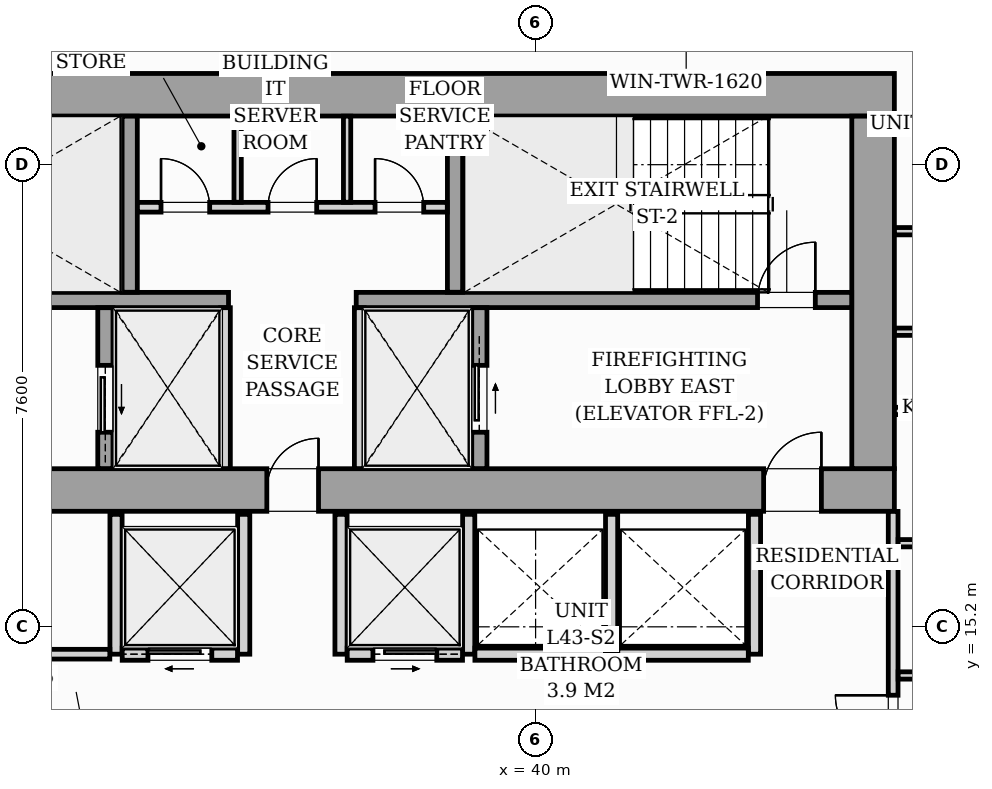
"""IFC4 building model, lengths in metres.
Left out: names, types, materials, properties, quantities, classifications, styles, units other than length and angle.
Written with IfcOpenShell. Run it as: python <this file> out.ifc"""

import sys

from ifc_helpers import new_model, si_unit, direction, frame, frame_2d, origin, origin_2d, place, context, subcontext, project, spatial, rectangle, i_section, extrude, source, transform, mapped, element, fill, save


model = new_model("IFC4")
c1 = context("Model", 3, precision=1e-05, world=origin(), true_north=direction((0.0, 1.0)))
c2 = subcontext(c1, "Body", "Model", "MODEL_VIEW")
j1 = project(units=[si_unit("LENGTHUNIT", "METRE"), si_unit("PLANEANGLEUNIT", "RADIAN")], contexts=[c1])
p1 = place(None, origin())
s1 = spatial("IfcSite", under=j1, at=p1, CompositionType="ELEMENT")
p2 = place(p1, origin())
s2 = spatial("IfcBuilding", under=s1, at=p2, CompositionType="ELEMENT")
p3 = place(p2, frame((0.0, 0.0, 150.2)))
s3 = spatial("IfcBuildingStorey", under=s2, at=p3, CompositionType="ELEMENT", Elevation=150.2)
m1 = source(origin(), c2, "Body", "SweptSolid", [
    extrude(i_section(OverallWidth=0.421, OverallDepth=0.465, WebThickness=0.045, FlangeThickness=0.073, FilletRadius=0.018, at=origin_2d()), origin(), (0.0, 0.0, 1.0), 3.196),
])
for number, where, z_axis, x_axis in (
    (1, (33.12, 17.4, 0.002), (0.0, 0.0, 1.0), (1.0, 0.0, 0.0)),
    (2, (38.88, 17.4, 0.002), (0.0, 0.0, 1.0), (1.0, 0.0, 0.0)),
    (3, (45.6, 17.4, 0.002), (0.0, 0.0, 1.0), (1.0, 0.0, 0.0)),
    (4, (33.12, 24.0, 0.002), (0.0, 0.0, 1.0), (1.0, 0.0, 0.0)),
    (5, (38.88, 24.0, 0.002), (0.0, 0.0, 1.0), (1.0, 0.0, 0.0)),
    (6, (45.6, 24.0, 0.002), (0.0, 0.0, 1.0), (1.0, 0.0, 0.0)),
):
    element("IfcColumn", number, at=place(p3, frame(where, z_axis=z_axis, x_axis=x_axis)), inside=s3, PredefinedType="PILASTER", context=c2, shape_type="MappedRepresentation", body=[
        mapped(m1, transform((0.0, 0.0, 0.0), scale=1.0)),
    ])
p4 = place(p3, frame((40.983, 25.727, 0.0), z_axis=(0.0, 0.0, 1.0), x_axis=(0.995395844771, -0.095849424686, 0.0)))
e7 = element("IfcWall", 7, at=p4, inside=s3, PredefinedType="STANDARD", context=c2, shape_type="SweptSolid", body=[
    extrude(rectangle(XDim=17.01, YDim=0.26, at=frame_2d((8.505, 0.0))), origin(), (0.0, 0.0, 1.0), 2.94),
])
p5 = place(p4, frame((9.1, 0.0, 0.0)))
e8 = element("IfcOpeningElement", 8, at=p5, cuts=e7, PredefinedType="OPENING", context=c2, shape_type="SweptSolid", body=[
    extrude(rectangle(XDim=1.8, YDim=2.06, at=frame_2d((0.9, 1.03))), frame((0.0, 0.14, 0.0), z_axis=(0.0, -1.0, 0.0), x_axis=(1.0, 0.0, 0.0)), (0.0, 0.0, 1.0), 0.28),
])
p6 = place(p4, frame((0.7, 0.0, 0.65)))
e9 = element("IfcOpeningElement", 9, at=p6, cuts=e7, PredefinedType="OPENING", context=c2, shape_type="SweptSolid", body=[
    extrude(rectangle(XDim=1.6, YDim=1.5, at=frame_2d((0.8, 0.75))), frame((0.0, 0.14, 0.0), z_axis=(0.0, -1.0, 0.0), x_axis=(1.0, 0.0, 0.0)), (0.0, 0.0, 1.0), 0.28),
])
p7 = place(p3, frame((26.1, 17.45, 0.0), z_axis=(0.0, 0.0, 1.0), x_axis=(1.0, 0.0, 0.0)))
e10 = element("IfcWall", 10, at=p7, inside=s3, PredefinedType="SHEAR", context=c2, shape_type="SweptSolid", body=[
    extrude(rectangle(XDim=19.8, YDim=0.7, at=frame_2d((9.9, 0.0))), origin(), (0.0, 0.0, 1.0), 3.2),
])
p8 = place(p7, frame((1.05, 0.0, 0.0)))
e11 = element("IfcOpeningElement", 11, at=p8, cuts=e10, PredefinedType="OPENING", context=c2, shape_type="SweptSolid", body=[
    extrude(rectangle(XDim=0.95, YDim=2.06, at=frame_2d((0.475, 1.03))), frame((0.0, 0.36, 0.0), z_axis=(0.0, -1.0, 0.0), x_axis=(1.0, 0.0, 0.0)), (0.0, 0.0, 1.0), 0.72),
])
p9 = place(p7, frame((9.48, 0.0, 0.0)))
e12 = element("IfcOpeningElement", 12, at=p9, cuts=e10, PredefinedType="OPENING", context=c2, shape_type="SweptSolid", body=[
    extrude(rectangle(XDim=0.85, YDim=2.0, at=frame_2d((0.425, 1.0))), frame((0.0, 0.36, 0.0), z_axis=(0.0, -1.0, 0.0), x_axis=(1.0, 0.0, 0.0)), (0.0, 0.0, 1.0), 0.72),
])
p10 = place(p7, frame((17.65, 0.0, 0.0)))
e13 = element("IfcOpeningElement", 13, at=p10, cuts=e10, PredefinedType="OPENING", context=c2, shape_type="SweptSolid", body=[
    extrude(rectangle(XDim=0.95, YDim=2.06, at=frame_2d((0.475, 1.03))), frame((0.0, 0.36, 0.0), z_axis=(0.0, -1.0, 0.0), x_axis=(1.0, 0.0, 0.0)), (0.0, 0.0, 1.0), 0.72),
])
p11 = place(p3, frame((26.1, 23.95, 0.0), z_axis=(0.0, 0.0, 1.0), x_axis=(1.0, 0.0, 0.0)))
e14 = element("IfcWall", 14, at=p11, inside=s3, PredefinedType="SHEAR", context=c2, shape_type="SweptSolid", body=[
    extrude(rectangle(XDim=19.8, YDim=0.7, at=frame_2d((9.9, 0.0))), origin(), (0.0, 0.0, 1.0), 3.2),
])
p12 = place(p3, frame((45.55, 17.802, 0.0), z_axis=(0.0, 0.0, 1.0), x_axis=(0.0, 1.0, 0.0)))
e15 = element("IfcWall", 15, at=p12, inside=s3, PredefinedType="SHEAR", context=c2, shape_type="SweptSolid", body=[
    extrude(rectangle(XDim=5.796, YDim=0.7, at=frame_2d((2.898, 0.0))), origin(), (0.0, 0.0, 1.0), 3.2),
])
p13 = place(p3, frame((26.802, 20.575, 0.0), z_axis=(0.0, 0.0, 1.0), x_axis=(1.0, 0.0, 0.0)))
e16 = element("IfcWall", 16, at=p13, inside=s3, PredefinedType="SOLIDWALL", context=c2, shape_type="SweptSolid", body=[
    extrude(rectangle(XDim=8.148, YDim=0.25, at=frame_2d((4.074, 0.0))), origin(), (0.0, 0.0, 1.0), 3.2),
])
p14 = place(p13, frame((0.348, 0.0, 0.0)))
e17 = element("IfcOpeningElement", 17, at=p14, cuts=e16, PredefinedType="OPENING", context=c2, shape_type="SweptSolid", body=[
    extrude(rectangle(XDim=0.95, YDim=2.06, at=frame_2d((0.475, 1.03))), frame((0.0, 0.135, 0.0), z_axis=(0.0, -1.0, 0.0), x_axis=(1.0, 0.0, 0.0)), (0.0, 0.0, 1.0), 0.27),
])
p15 = place(p3, frame((37.05, 20.575, 0.0), z_axis=(0.0, 0.0, 1.0), x_axis=(1.0, 0.0, 0.0)))
e18 = element("IfcWall", 18, at=p15, inside=s3, PredefinedType="SOLIDWALL", context=c2, shape_type="SweptSolid", body=[
    extrude(rectangle(XDim=8.148, YDim=0.25, at=frame_2d((4.074, 0.0))), origin(), (0.0, 0.0, 1.0), 3.2),
])
p16 = place(p15, frame((6.6, 0.0, 0.0)))
e19 = element("IfcOpeningElement", 19, at=p16, cuts=e18, PredefinedType="OPENING", context=c2, shape_type="SweptSolid", body=[
    extrude(rectangle(XDim=0.95, YDim=2.06, at=frame_2d((0.475, 1.03))), frame((0.0, 0.135, 0.0), z_axis=(0.0, -1.0, 0.0), x_axis=(1.0, 0.0, 0.0)), (0.0, 0.0, 1.0), 0.27),
])
for number, where, z_axis, x_axis in (
    (20, (33.325, 20.702, 0.0), (0.0, 0.0, 1.0), (0.0, 1.0, 0.0)),
    (21, (38.675, 20.702, 0.0), (0.0, 0.0, 1.0), (0.0, 1.0, 0.0)),
):
    element("IfcWall", number, at=place(p3, frame(where, z_axis=z_axis, x_axis=x_axis)), inside=s3, PredefinedType="SOLIDWALL", context=c2, shape_type="SweptSolid", body=[
        extrude(rectangle(XDim=2.896, YDim=0.25, at=frame_2d((1.448, 0.0))), origin(), (0.0, 0.0, 1.0), 3.2),
    ])
p17 = place(p3, frame((32.925, 17.802, 0.0), z_axis=(0.0, 0.0, 1.0), x_axis=(0.0, 1.0, 0.0)))
e22 = element("IfcWall", 22, at=p17, inside=s3, PredefinedType="SOLIDWALL", context=c2, shape_type="SweptSolid", body=[
    extrude(rectangle(XDim=2.646, YDim=0.25, at=frame_2d((1.323, 0.0))), origin(), (0.0, 0.0, 1.0), 3.2),
])
p18 = place(p17, frame((0.598, 0.0, 0.0)))
e23 = element("IfcOpeningElement", 23, at=p18, cuts=e22, PredefinedType="OPENING", context=c2, shape_type="SweptSolid", body=[
    extrude(rectangle(XDim=1.1, YDim=2.08, at=frame_2d((0.55, 1.04))), frame((0.0, 0.135, 0.0), z_axis=(0.0, -1.0, 0.0), x_axis=(1.0, 0.0, 0.0)), (0.0, 0.0, 1.0), 0.27),
])
for number, where, z_axis, x_axis in (
    (24, (34.9, 17.802, 0.0), (0.0, 0.0, 1.0), (0.0, 1.0, 0.0)),
    (25, (37.1, 17.802, 0.0), (0.0, 0.0, 1.0), (0.0, 1.0, 0.0)),
):
    element("IfcWall", number, at=place(p3, frame(where, z_axis=z_axis, x_axis=x_axis)), inside=s3, PredefinedType="PARTITIONING", context=c2, shape_type="SweptSolid", body=[
        extrude(rectangle(XDim=2.646, YDim=0.16, at=frame_2d((1.323, 0.0))), origin(), (0.0, 0.0, 1.0), 2.94),
    ])
p19 = place(p3, frame((39.075, 17.802, 0.0), z_axis=(0.0, 0.0, 1.0), x_axis=(0.0, 1.0, 0.0)))
e26 = element("IfcWall", 26, at=p19, inside=s3, PredefinedType="SOLIDWALL", context=c2, shape_type="SweptSolid", body=[
    extrude(rectangle(XDim=2.646, YDim=0.25, at=frame_2d((1.323, 0.0))), origin(), (0.0, 0.0, 1.0), 3.2),
])
p20 = place(p19, frame((0.598, 0.0, 0.0)))
e27 = element("IfcOpeningElement", 27, at=p20, cuts=e26, PredefinedType="OPENING", context=c2, shape_type="SweptSolid", body=[
    extrude(rectangle(XDim=1.1, YDim=2.08, at=frame_2d((0.55, 1.04))), frame((0.0, 0.135, 0.0), z_axis=(0.0, -1.0, 0.0), x_axis=(1.0, 0.0, 0.0)), (0.0, 0.0, 1.0), 0.27),
])
p21 = place(p3, frame((33.452, 22.1, 0.0), z_axis=(0.0, 0.0, 1.0), x_axis=(1.0, 0.0, 0.0)))
e28 = element("IfcWall", 28, at=p21, inside=s3, PredefinedType="PARTITIONING", context=c2, shape_type="SweptSolid", body=[
    extrude(rectangle(XDim=5.096, YDim=0.16, at=frame_2d((2.548, 0.0))), origin(), (0.0, 0.0, 1.0), 2.94),
])
p22 = place(p21, frame((0.388, 0.0, 0.0)))
e29 = element("IfcOpeningElement", 29, at=p22, cuts=e28, PredefinedType="OPENING", context=c2, shape_type="SweptSolid", body=[
    extrude(rectangle(XDim=0.8, YDim=2.05, at=frame_2d((0.4, 1.025))), frame((0.0, 0.09, 0.0), z_axis=(0.0, -1.0, 0.0), x_axis=(1.0, 0.0, 0.0)), (0.0, 0.0, 1.0), 0.18),
])
p23 = place(p21, frame((2.148, 0.0, 0.0)))
e30 = element("IfcOpeningElement", 30, at=p23, cuts=e28, PredefinedType="OPENING", context=c2, shape_type="SweptSolid", body=[
    extrude(rectangle(XDim=0.8, YDim=2.05, at=frame_2d((0.4, 1.025))), frame((0.0, 0.09, 0.0), z_axis=(0.0, -1.0, 0.0), x_axis=(1.0, 0.0, 0.0)), (0.0, 0.0, 1.0), 0.18),
])
p24 = place(p21, frame((3.908, 0.0, 0.0)))
e31 = element("IfcOpeningElement", 31, at=p24, cuts=e28, PredefinedType="OPENING", context=c2, shape_type="SweptSolid", body=[
    extrude(rectangle(XDim=0.8, YDim=2.05, at=frame_2d((0.4, 1.025))), frame((0.0, 0.09, 0.0), z_axis=(0.0, -1.0, 0.0), x_axis=(1.0, 0.0, 0.0)), (0.0, 0.0, 1.0), 0.18),
])
for number, where, z_axis, x_axis in (
    (32, (35.1, 22.182, 0.0), (0.0, 0.0, 1.0), (0.0, 1.0, 0.0)),
    (33, (36.9, 22.182, 0.0), (0.0, 0.0, 1.0), (0.0, 1.0, 0.0)),
):
    element("IfcWall", number, at=place(p3, frame(where, z_axis=z_axis, x_axis=x_axis)), inside=s3, PredefinedType="PARTITIONING", context=c2, shape_type="SweptSolid", body=[
        extrude(rectangle(XDim=1.416, YDim=0.12, at=frame_2d((0.708, 0.0))), origin(), (0.0, 0.0, 1.0), 2.94),
    ])
p25 = place(p3, frame((33.1, 14.75, 0.0), z_axis=(0.0, 0.0, 1.0), x_axis=(0.0, 1.0, 0.0)))
e34 = element("IfcWall", 34, at=p25, inside=s3, PredefinedType="PARTITIONING", context=c2, shape_type="SweptSolid", body=[
    extrude(rectangle(XDim=2.3, YDim=0.2, at=frame_2d((1.15, 0.0))), origin(), (0.0, 0.0, 1.0), 2.94),
])
p26 = place(p3, frame((28.482, 14.75, 0.0), z_axis=(0.0, 0.0, 1.0), x_axis=(1.0, 0.0, 0.0)))
e35 = element("IfcWall", 35, at=p26, inside=s3, PredefinedType="PARTITIONING", context=c2, shape_type="SweptSolid", body=[
    extrude(rectangle(XDim=4.516, YDim=0.16, at=frame_2d((2.258, 0.0))), origin(), (0.0, 0.0, 1.0), 2.94),
])
p27 = place(p26, frame((1.868, 0.0, 0.0)))
e36 = element("IfcOpeningElement", 36, at=p27, cuts=e35, PredefinedType="OPENING", context=c2, shape_type="SweptSolid", body=[
    extrude(rectangle(XDim=0.8, YDim=2.05, at=frame_2d((0.4, 1.025))), frame((0.0, 0.09, 0.0), z_axis=(0.0, -1.0, 0.0), x_axis=(1.0, 0.0, 0.0)), (0.0, 0.0, 1.0), 0.18),
])
p28 = place(p3, frame((35.2, 14.75, 0.0), z_axis=(0.0, 0.0, 1.0), x_axis=(0.0, 1.0, 0.0)))
e37 = element("IfcWall", 37, at=p28, inside=s3, PredefinedType="PARTITIONING", context=c2, shape_type="SweptSolid", body=[
    extrude(rectangle(XDim=2.3, YDim=0.2, at=frame_2d((1.15, 0.0))), origin(), (0.0, 0.0, 1.0), 2.94),
])
p29 = place(p3, frame((33.202, 14.75, 0.0), z_axis=(0.0, 0.0, 1.0), x_axis=(1.0, 0.0, 0.0)))
e38 = element("IfcWall", 38, at=p29, inside=s3, PredefinedType="PARTITIONING", context=c2, shape_type="SweptSolid", body=[
    extrude(rectangle(XDim=1.896, YDim=0.2, at=frame_2d((0.948, 0.0))), origin(), (0.0, 0.0, 1.0), 2.94),
])
p30 = place(p29, frame((0.423, 0.0, 0.0)))
e39 = element("IfcOpeningElement", 39, at=p30, cuts=e38, PredefinedType="OPENING", context=c2, shape_type="SweptSolid", body=[
    extrude(rectangle(XDim=1.05, YDim=2.08, at=frame_2d((0.525, 1.04))), frame((0.0, 0.11, 0.0), z_axis=(0.0, -1.0, 0.0), x_axis=(1.0, 0.0, 0.0)), (0.0, 0.0, 1.0), 0.22),
])
for number, where, z_axis, x_axis in (
    (40, (36.8, 14.75, 0.0), (0.0, 0.0, 1.0), (0.0, 1.0, 0.0)),
    (41, (38.9, 14.75, 0.0), (0.0, 0.0, 1.0), (0.0, 1.0, 0.0)),
):
    element("IfcWall", number, at=place(p3, frame(where, z_axis=z_axis, x_axis=x_axis)), inside=s3, PredefinedType="PARTITIONING", context=c2, shape_type="SweptSolid", body=[
        extrude(rectangle(XDim=2.3, YDim=0.2, at=frame_2d((1.15, 0.0))), origin(), (0.0, 0.0, 1.0), 2.94),
    ])
p31 = place(p3, frame((36.902, 14.75, 0.0), z_axis=(0.0, 0.0, 1.0), x_axis=(1.0, 0.0, 0.0)))
e42 = element("IfcWall", 42, at=p31, inside=s3, PredefinedType="PARTITIONING", context=c2, shape_type="SweptSolid", body=[
    extrude(rectangle(XDim=1.896, YDim=0.2, at=frame_2d((0.948, 0.0))), origin(), (0.0, 0.0, 1.0), 2.94),
])
p32 = place(p31, frame((0.423, 0.0, 0.0)))
e43 = element("IfcOpeningElement", 43, at=p32, cuts=e42, PredefinedType="OPENING", context=c2, shape_type="SweptSolid", body=[
    extrude(rectangle(XDim=1.05, YDim=2.08, at=frame_2d((0.525, 1.04))), frame((0.0, 0.11, 0.0), z_axis=(0.0, -1.0, 0.0), x_axis=(1.0, 0.0, 0.0)), (0.0, 0.0, 1.0), 0.22),
])
for number, where, z_axis, x_axis in (
    (44, (41.25, 14.75, 0.0), (0.0, 0.0, 1.0), (0.0, 1.0, 0.0)),
    (45, (43.6, 14.75, 0.0), (0.0, 0.0, 1.0), (0.0, 1.0, 0.0)),
):
    element("IfcWall", number, at=place(p3, frame(where, z_axis=z_axis, x_axis=x_axis)), inside=s3, PredefinedType="PARTITIONING", context=c2, shape_type="SweptSolid", body=[
        extrude(rectangle(XDim=2.3, YDim=0.2, at=frame_2d((1.15, 0.0))), origin(), (0.0, 0.0, 1.0), 2.94),
    ])
for number, where, z_axis, x_axis in (
    (46, (39.002, 14.75, 0.0), (0.0, 0.0, 1.0), (1.0, 0.0, 0.0)),
    (47, (41.352, 14.75, 0.0), (0.0, 0.0, 1.0), (1.0, 0.0, 0.0)),
):
    element("IfcWall", number, at=place(p3, frame(where, z_axis=z_axis, x_axis=x_axis)), inside=s3, PredefinedType="PARTITIONING", context=c2, shape_type="SweptSolid", body=[
        extrude(rectangle(XDim=2.146, YDim=0.2, at=frame_2d((1.073, 0.0))), origin(), (0.0, 0.0, 1.0), 2.94),
    ])
p33 = place(p3, frame((45.88, 12.632, 0.0), z_axis=(0.0, 0.0, 1.0), x_axis=(0.0, 1.0, 0.0)))
e48 = element("IfcWall", 48, at=p33, inside=s3, PredefinedType="PARTITIONING", context=c2, shape_type="SweptSolid", body=[
    extrude(rectangle(XDim=4.466, YDim=0.16, at=frame_2d((2.233, 0.0))), origin(), (0.0, 0.0, 1.0), 2.94),
])
p34 = place(p33, frame((0.493, 0.0, 0.0)))
e49 = element("IfcOpeningElement", 49, at=p34, cuts=e48, PredefinedType="OPENING", context=c2, shape_type="SweptSolid", body=[
    extrude(rectangle(XDim=0.95, YDim=2.06, at=frame_2d((0.475, 1.03))), frame((0.0, 0.09, 0.0), z_axis=(0.0, -1.0, 0.0), x_axis=(1.0, 0.0, 0.0)), (0.0, 0.0, 1.0), 0.18),
])
for number, where, z_axis, x_axis in (
    (50, (45.962, 16.575, 0.0), (0.0, 0.0, 1.0), (1.0, 0.0, 0.0)),
    (51, (45.962, 14.4, 0.0), (0.0, 0.0, 1.0), (1.0, 0.0, 0.0)),
):
    element("IfcWall", number, at=place(p3, frame(where, z_axis=z_axis, x_axis=x_axis)), inside=s3, PredefinedType="PARTITIONING", context=c2, shape_type="SweptSolid", body=[
        extrude(rectangle(XDim=2.256, YDim=0.12, at=frame_2d((1.128, 0.0))), origin(), (0.0, 0.0, 1.0), 2.94),
    ])
p35 = place(p3, frame((45.902, 18.75, 0.0), z_axis=(0.0, 0.0, 1.0), x_axis=(1.0, 0.0, 0.0)))
e52 = element("IfcWall", 52, at=p35, inside=s3, PredefinedType="PARTITIONING", context=c2, shape_type="SweptSolid", body=[
    extrude(rectangle(XDim=2.316, YDim=0.12, at=frame_2d((1.158, 0.0))), origin(), (0.0, 0.0, 1.0), 2.94),
])
p36 = place(p3, frame((45.902, 21.706, 0.0), z_axis=(0.0, 0.0, 1.0), x_axis=(1.0, 0.0, 0.0)))
e53 = element("IfcWall", 53, at=p36, inside=s3, PredefinedType="PARTITIONING", context=c2, shape_type="SweptSolid", body=[
    extrude(rectangle(XDim=12.775, YDim=0.12, at=frame_2d((6.388, 0.0))), origin(), (0.0, 0.0, 1.0), 2.94),
])
p37 = place(p36, frame((4.501, 0.0, 0.0)))
e54 = element("IfcOpeningElement", 54, at=p37, cuts=e53, PredefinedType="OPENING", context=c2, shape_type="SweptSolid", body=[
    extrude(rectangle(XDim=0.85, YDim=2.05, at=frame_2d((0.425, 1.025))), frame((0.0, 0.07, 0.0), z_axis=(0.0, -1.0, 0.0), x_axis=(1.0, 0.0, 0.0)), (0.0, 0.0, 1.0), 0.14),
])
p38 = place(p3, frame((45.902, 20.053, 0.0), z_axis=(0.0, 0.0, 1.0), x_axis=(1.0, 0.0, 0.0)))
e55 = element("IfcWall", 55, at=p38, inside=s3, PredefinedType="PARTITIONING", context=c2, shape_type="SweptSolid", body=[
    extrude(rectangle(XDim=14.055, YDim=0.12, at=frame_2d((7.027, 0.0))), origin(), (0.0, 0.0, 1.0), 2.94),
])
p39 = place(p38, frame((4.501, 0.0, 0.0)))
e56 = element("IfcOpeningElement", 56, at=p39, cuts=e55, PredefinedType="OPENING", context=c2, shape_type="SweptSolid", body=[
    extrude(rectangle(XDim=0.85, YDim=2.05, at=frame_2d((0.425, 1.025))), frame((0.0, 0.07, 0.0), z_axis=(0.0, -1.0, 0.0), x_axis=(1.0, 0.0, 0.0)), (0.0, 0.0, 1.0), 0.14),
])
m2 = source(origin(), c2, "Body", "SweptSolid", [
    extrude(rectangle(XDim=0.85, YDim=2.0, at=frame_2d((0.425, 1.0))), frame((0.0, 0.025, 0.0), z_axis=(0.0, -1.0, 0.0), x_axis=(1.0, 0.0, 0.0)), (0.0, 0.0, 1.0), 0.05),
])
p40 = place(p9, origin())
e57 = element("IfcDoor", 57, at=p40, inside=s3, OperationType="SINGLE_SWING_RIGHT", PredefinedType="DOOR", context=c2, shape_type="MappedRepresentation", body=[
    mapped(m2, transform((0.0, 0.0, 0.0), scale=1.0)),
])
fill(e12, e57)
m3 = source(origin(), c2, "Body", "SweptSolid", [
    extrude(rectangle(XDim=0.95, YDim=2.06, at=frame_2d((0.475, 1.03))), frame((0.0, 0.025, 0.0), z_axis=(0.0, -1.0, 0.0), x_axis=(1.0, 0.0, 0.0)), (0.0, 0.0, 1.0), 0.05),
])
p41 = place(p10, origin())
e58 = element("IfcDoor", 58, at=p41, inside=s3, OperationType="SINGLE_SWING_RIGHT", PredefinedType="DOOR", context=c2, shape_type="MappedRepresentation", body=[
    mapped(m3, transform((0.0, 0.0, 0.0), scale=1.0)),
])
fill(e13, e58)
p42 = place(p16, origin())
e59 = element("IfcDoor", 59, at=p42, inside=s3, OperationType="SINGLE_SWING_RIGHT", PredefinedType="DOOR", context=c2, shape_type="MappedRepresentation", body=[
    mapped(m3, transform((0.0, 0.0, 0.0), scale=1.0)),
])
fill(e19, e59)
m4 = source(origin(), c2, "Body", "SweptSolid", [
    extrude(rectangle(XDim=1.1, YDim=2.08, at=frame_2d((0.55, 1.04))), frame((0.0, 0.025, 0.0), z_axis=(0.0, -1.0, 0.0), x_axis=(1.0, 0.0, 0.0)), (0.0, 0.0, 1.0), 0.05),
])
p43 = place(p18, origin())
e60 = element("IfcDoor", 60, at=p43, inside=s3, OperationType="SLIDING_TO_LEFT", PredefinedType="DOOR", context=c2, shape_type="MappedRepresentation", body=[
    mapped(m4, transform((0.0, 0.0, 0.0), scale=1.0)),
])
fill(e23, e60)
p44 = place(p20, origin())
e61 = element("IfcDoor", 61, at=p44, inside=s3, OperationType="SLIDING_TO_RIGHT", PredefinedType="DOOR", context=c2, shape_type="MappedRepresentation", body=[
    mapped(m4, transform((0.0, 0.0, 0.0), scale=1.0)),
])
fill(e27, e61)
m5 = source(origin(), c2, "Body", "SweptSolid", [
    extrude(rectangle(XDim=0.8, YDim=2.05, at=frame_2d((0.4, 1.025))), frame((0.0, 0.025, 0.0), z_axis=(0.0, -1.0, 0.0), x_axis=(1.0, 0.0, 0.0)), (0.0, 0.0, 1.0), 0.05),
])
p45 = place(p22, origin())
e62 = element("IfcDoor", 62, at=p45, inside=s3, OperationType="SINGLE_SWING_LEFT", PredefinedType="DOOR", context=c2, shape_type="MappedRepresentation", body=[
    mapped(m5, transform((0.0, 0.0, 0.0), scale=1.0)),
])
fill(e29, e62)
p46 = place(p23, origin())
e63 = element("IfcDoor", 63, at=p46, inside=s3, OperationType="SINGLE_SWING_RIGHT", PredefinedType="DOOR", context=c2, shape_type="MappedRepresentation", body=[
    mapped(m5, transform((0.0, 0.0, 0.0), scale=1.0)),
])
fill(e30, e63)
p47 = place(p24, origin())
e64 = element("IfcDoor", 64, at=p47, inside=s3, OperationType="SINGLE_SWING_LEFT", PredefinedType="DOOR", context=c2, shape_type="MappedRepresentation", body=[
    mapped(m5, transform((0.0, 0.0, 0.0), scale=1.0)),
])
fill(e31, e64)
m6 = source(origin(), c2, "Body", "SweptSolid", [
    extrude(rectangle(XDim=1.05, YDim=2.08, at=frame_2d((0.525, 1.04))), frame((0.0, 0.025, 0.0), z_axis=(0.0, -1.0, 0.0), x_axis=(1.0, 0.0, 0.0)), (0.0, 0.0, 1.0), 0.05),
])
p48 = place(p30, origin())
e65 = element("IfcDoor", 65, at=p48, inside=s3, OperationType="SLIDING_TO_LEFT", PredefinedType="DOOR", context=c2, shape_type="MappedRepresentation", body=[
    mapped(m6, transform((0.0, 0.0, 0.0), scale=1.0)),
])
fill(e39, e65)
p49 = place(p32, origin())
e66 = element("IfcDoor", 66, at=p49, inside=s3, OperationType="SLIDING_TO_RIGHT", PredefinedType="DOOR", context=c2, shape_type="MappedRepresentation", body=[
    mapped(m6, transform((0.0, 0.0, 0.0), scale=1.0)),
])
fill(e43, e66)
m7 = source(origin(), c2, "Body", "SweptSolid", [
    extrude(rectangle(XDim=0.95, YDim=2.06, at=frame_2d((0.475, 1.03))), frame((0.0, 0.025, 0.0), z_axis=(0.0, -1.0, 0.0), x_axis=(1.0, 0.0, 0.0)), (0.0, 0.0, 1.0), 0.05),
])
p50 = place(p34, origin())
e67 = element("IfcDoor", 67, at=p50, inside=s3, OperationType="SINGLE_SWING_RIGHT", PredefinedType="DOOR", context=c2, shape_type="MappedRepresentation", body=[
    mapped(m7, transform((0.0, 0.0, 0.0), scale=1.0)),
])
fill(e49, e67)
save(model, sys.argv[1])
